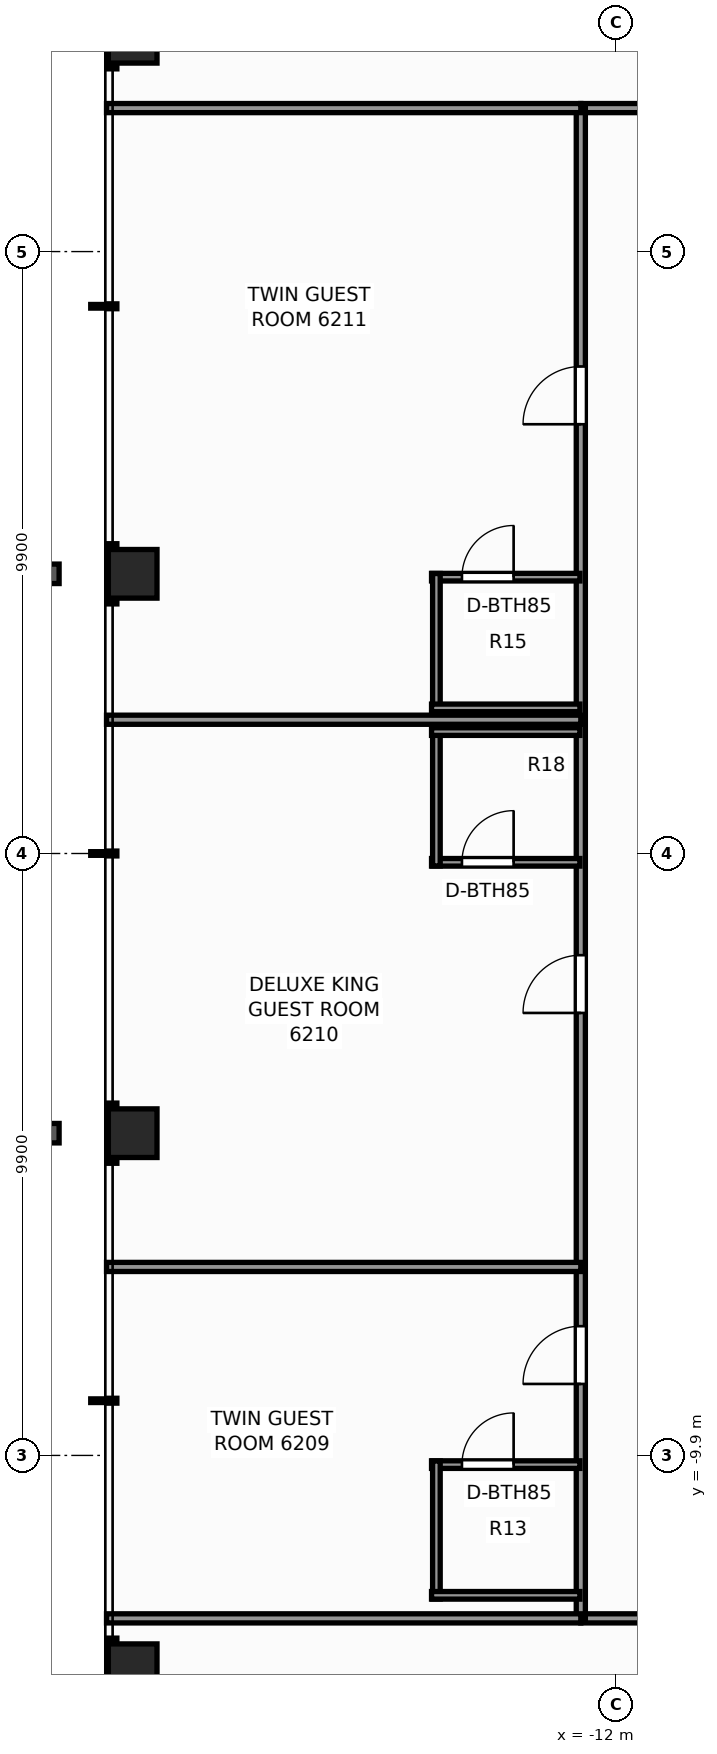
"""IFC4 building model, lengths in metres.
Left out: names, types, materials, properties, quantities, classifications, styles, units other than length and angle.
Written with IfcOpenShell. Run it as: python <this file> out.ifc"""

import sys

from ifc_helpers import new_model, si_unit, direction, frame, frame_2d, origin, origin_2d, place, context, subcontext, project, spatial, rectangle, extrude, element, fill, save


model = new_model("IFC4")
c1 = context("Model", 3, precision=1e-05, world=origin(), true_north=direction((0.0, 1.0)))
c2 = subcontext(c1, "Body", "Model", "MODEL_VIEW")
j1 = project(units=[si_unit("LENGTHUNIT", "METRE"), si_unit("PLANEANGLEUNIT", "RADIAN")], contexts=[c1])
p1 = place(None, origin())
s1 = spatial("IfcSite", under=j1, at=p1, CompositionType="ELEMENT")
p2 = place(p1, origin())
s2 = spatial("IfcBuilding", under=s1, at=p2, CompositionType="ELEMENT")
p3 = place(p2, frame((0.0, 0.0, 213.0)))
s3 = spatial("IfcBuildingStorey", under=s2, at=p3, CompositionType="ELEMENT", Elevation=213.0)
for number, where, z_axis, x_axis in (
    (1, (-19.95, -13.4, 0.0), (0.0, 0.0, 1.0), (1.0, 0.0, 0.0)),
    (2, (-19.95, -4.6, 0.0), (0.0, 0.0, 1.0), (1.0, 0.0, 0.0)),
    (3, (-19.95, 4.6, 0.0), (0.0, 0.0, 1.0), (1.0, 0.0, 0.0)),
    (4, (-19.95, 13.4, 0.0), (0.0, 0.0, 1.0), (1.0, 0.0, 0.0)),
):
    element("IfcColumn", number, at=place(p3, frame(where, z_axis=z_axis, x_axis=x_axis)), inside=s3, PredefinedType="COLUMN", context=c2, shape_type="SweptSolid", body=[
        extrude(rectangle(XDim=0.8, YDim=0.8, at=origin_2d()), origin(), (0.0, 0.0, 1.0), 3.3),
    ])
p4 = place(p3, frame((-12.58, -12.58, 0.0), z_axis=(0.0, 0.0, 1.0), x_axis=(1.0, 0.0, 0.0)))
e5 = element("IfcWall", 5, at=p4, inside=s3, PredefinedType="PARTITIONING", context=c2, shape_type="SweptSolid", body=[
    extrude(rectangle(XDim=25.16, YDim=0.15, at=frame_2d((12.58, 0.0))), origin(), (0.0, 0.0, 1.0), 2.369),
])
p5 = place(p4, frame((3.919, 0.0, 0.0)))
e6 = element("IfcOpeningElement", 6, at=p5, cuts=e5, PredefinedType="OPENING", context=c2, shape_type="SweptSolid", body=[
    extrude(rectangle(XDim=0.9, YDim=2.06, at=frame_2d((0.45, 1.03))), frame((0.0, 0.085, 0.0), z_axis=(0.0, -1.0, 0.0), x_axis=(1.0, 0.0, 0.0)), (0.0, 0.0, 1.0), 0.17),
])
p6 = place(p4, frame((8.951, 0.0, 0.0)))
e7 = element("IfcOpeningElement", 7, at=p6, cuts=e5, PredefinedType="OPENING", context=c2, shape_type="SweptSolid", body=[
    extrude(rectangle(XDim=0.9, YDim=2.06, at=frame_2d((0.45, 1.03))), frame((0.0, 0.085, 0.0), z_axis=(0.0, -1.0, 0.0), x_axis=(1.0, 0.0, 0.0)), (0.0, 0.0, 1.0), 0.17),
])
p7 = place(p4, frame((10.78, 0.0, 0.0)))
e8 = element("IfcOpeningElement", 8, at=p7, cuts=e5, PredefinedType="OPENING", context=c2, shape_type="SweptSolid", body=[
    extrude(rectangle(XDim=0.9, YDim=2.06, at=frame_2d((0.45, 1.03))), frame((0.0, 0.085, 0.0), z_axis=(0.0, -1.0, 0.0), x_axis=(1.0, 0.0, 0.0)), (0.0, 0.0, 1.0), 0.17),
])
p8 = place(p4, frame((13.749, 0.0, 0.0)))
e9 = element("IfcOpeningElement", 9, at=p8, cuts=e5, PredefinedType="OPENING", context=c2, shape_type="SweptSolid", body=[
    extrude(rectangle(XDim=0.95, YDim=2.06, at=frame_2d((0.475, 1.03))), frame((0.0, 0.085, 0.0), z_axis=(0.0, -1.0, 0.0), x_axis=(1.0, 0.0, 0.0)), (0.0, 0.0, 1.0), 0.17),
])
p9 = place(p4, frame((18.268, 0.0, 0.0)))
e10 = element("IfcOpeningElement", 10, at=p9, cuts=e5, PredefinedType="OPENING", context=c2, shape_type="SweptSolid", body=[
    extrude(rectangle(XDim=0.9, YDim=2.06, at=frame_2d((0.45, 1.03))), frame((0.0, 0.085, 0.0), z_axis=(0.0, -1.0, 0.0), x_axis=(1.0, 0.0, 0.0)), (0.0, 0.0, 1.0), 0.17),
])
p10 = place(p4, frame((20.283, 0.0, 0.0)))
e11 = element("IfcOpeningElement", 11, at=p10, cuts=e5, PredefinedType="OPENING", context=c2, shape_type="SweptSolid", body=[
    extrude(rectangle(XDim=0.95, YDim=2.06, at=frame_2d((0.475, 1.03))), frame((0.0, 0.085, 0.0), z_axis=(0.0, -1.0, 0.0), x_axis=(1.0, 0.0, 0.0)), (0.0, 0.0, 1.0), 0.17),
])
p11 = place(p3, frame((-12.58, 12.26, 0.0), z_axis=(0.0, 0.0, 1.0), x_axis=(1.0, 0.0, 0.0)))
e12 = element("IfcWall", 12, at=p11, inside=s3, PredefinedType="PARTITIONING", context=c2, shape_type="SweptSolid", body=[
    extrude(rectangle(XDim=25.16, YDim=0.15, at=frame_2d((12.58, 0.0))), origin(), (0.0, 0.0, 1.0), 2.369),
])
p12 = place(p11, frame((3.133, 0.0, 0.0)))
e13 = element("IfcOpeningElement", 13, at=p12, cuts=e12, PredefinedType="OPENING", context=c2, shape_type="SweptSolid", body=[
    extrude(rectangle(XDim=0.9, YDim=2.06, at=frame_2d((0.45, 1.03))), frame((0.0, 0.085, 0.0), z_axis=(0.0, -1.0, 0.0), x_axis=(1.0, 0.0, 0.0)), (0.0, 0.0, 1.0), 0.17),
])
p13 = place(p11, frame((9.188, 0.0, 0.0)))
e14 = element("IfcOpeningElement", 14, at=p13, cuts=e12, PredefinedType="OPENING", context=c2, shape_type="SweptSolid", body=[
    extrude(rectangle(XDim=0.95, YDim=2.06, at=frame_2d((0.475, 1.03))), frame((0.0, 0.085, 0.0), z_axis=(0.0, -1.0, 0.0), x_axis=(1.0, 0.0, 0.0)), (0.0, 0.0, 1.0), 0.17),
])
p14 = place(p11, frame((13.087, 0.0, 0.0)))
e15 = element("IfcOpeningElement", 15, at=p14, cuts=e12, PredefinedType="OPENING", context=c2, shape_type="SweptSolid", body=[
    extrude(rectangle(XDim=0.95, YDim=2.06, at=frame_2d((0.475, 1.03))), frame((0.0, 0.085, 0.0), z_axis=(0.0, -1.0, 0.0), x_axis=(1.0, 0.0, 0.0)), (0.0, 0.0, 1.0), 0.17),
])
p15 = place(p11, frame((19.665, 0.0, 0.0)))
e16 = element("IfcOpeningElement", 16, at=p15, cuts=e12, PredefinedType="OPENING", context=c2, shape_type="SweptSolid", body=[
    extrude(rectangle(XDim=0.9, YDim=2.06, at=frame_2d((0.45, 1.03))), frame((0.0, 0.085, 0.0), z_axis=(0.0, -1.0, 0.0), x_axis=(1.0, 0.0, 0.0)), (0.0, 0.0, 1.0), 0.17),
])
p16 = place(p3, frame((-12.58, -12.58, 0.0), z_axis=(0.0, 0.0, 1.0), x_axis=(0.0, 1.0, 0.0)))
e17 = element("IfcWall", 17, at=p16, inside=s3, PredefinedType="PARTITIONING", context=c2, shape_type="SweptSolid", body=[
    extrude(rectangle(XDim=24.84, YDim=0.15, at=frame_2d((12.42, 0.0))), origin(), (0.0, 0.0, 1.0), 2.369),
])
p17 = place(p16, frame((3.856, 0.0, 0.0)))
e18 = element("IfcOpeningElement", 18, at=p17, cuts=e17, PredefinedType="OPENING", context=c2, shape_type="SweptSolid", body=[
    extrude(rectangle(XDim=0.95, YDim=2.06, at=frame_2d((0.475, 1.03))), frame((0.0, 0.085, 0.0), z_axis=(0.0, -1.0, 0.0), x_axis=(1.0, 0.0, 0.0)), (0.0, 0.0, 1.0), 0.17),
])
p18 = place(p16, frame((9.958, 0.0, 0.0)))
e19 = element("IfcOpeningElement", 19, at=p18, cuts=e17, PredefinedType="OPENING", context=c2, shape_type="SweptSolid", body=[
    extrude(rectangle(XDim=0.95, YDim=2.06, at=frame_2d((0.475, 1.03))), frame((0.0, 0.085, 0.0), z_axis=(0.0, -1.0, 0.0), x_axis=(1.0, 0.0, 0.0)), (0.0, 0.0, 1.0), 0.17),
])
p19 = place(p16, frame((19.64, 0.0, 0.0)))
e20 = element("IfcOpeningElement", 20, at=p19, cuts=e17, PredefinedType="OPENING", context=c2, shape_type="SweptSolid", body=[
    extrude(rectangle(XDim=0.95, YDim=2.06, at=frame_2d((0.475, 1.03))), frame((0.0, 0.085, 0.0), z_axis=(0.0, -1.0, 0.0), x_axis=(1.0, 0.0, 0.0)), (0.0, 0.0, 1.0), 0.17),
])
for number, where, z_axis, x_axis in (
    (21, (-20.38, -12.58, 0.0), (0.0, 0.0, 1.0), (1.0, 0.0, 0.0)),
    (22, (-20.38, 12.26, 0.0), (0.0, 0.0, 1.0), (1.0, 0.0, 0.0)),
):
    element("IfcWall", number, at=place(p3, frame(where, z_axis=z_axis, x_axis=x_axis)), inside=s3, PredefinedType="PARTITIONING", context=c2, shape_type="SweptSolid", body=[
        extrude(rectangle(XDim=7.8, YDim=0.15, at=frame_2d((3.9, 0.0))), origin(), (0.0, 0.0, 1.0), 2.369),
    ])
p20 = place(p3, frame((-20.38, -6.8, 0.0), z_axis=(0.0, 0.0, 1.0), x_axis=(1.0, 0.0, 0.0)))
e23 = element("IfcWall", 23, at=p20, inside=s3, PredefinedType="PARTITIONING", context=c2, shape_type="SweptSolid", body=[
    extrude(rectangle(XDim=7.8, YDim=0.15, at=frame_2d((3.9, 0.0))), origin(), (0.0, 0.0, 1.0), 2.453),
])
p21 = place(p3, frame((-15.035, -10.051, 0.0), z_axis=(0.0, 0.0, 1.0), x_axis=(1.0, 0.0, 0.0)))
e24 = element("IfcWall", 24, at=p21, inside=s3, PredefinedType="PARTITIONING", context=c2, shape_type="SweptSolid", body=[
    extrude(rectangle(XDim=2.44, YDim=0.125, at=frame_2d((1.22, 0.0))), origin(), (0.0, 0.0, 1.0), 3.08),
])
p22 = place(p21, frame((0.5, 0.0, 0.0)))
e25 = element("IfcOpeningElement", 25, at=p22, cuts=e24, PredefinedType="OPENING", context=c2, shape_type="SweptSolid", body=[
    extrude(rectangle(XDim=0.85, YDim=2.03, at=frame_2d((0.425, 1.015))), frame((0.0, 0.073, 0.0), z_axis=(0.0, -1.0, 0.0), x_axis=(1.0, 0.0, 0.0)), (0.0, 0.0, 1.0), 0.145),
])
p23 = place(p3, frame((-14.955, -12.261, 0.0), z_axis=(0.0, 0.0, 1.0), x_axis=(0.0, 1.0, 0.0)))
e26 = element("IfcWall", 26, at=p23, inside=s3, PredefinedType="PARTITIONING", context=c2, shape_type="SweptSolid", body=[
    extrude(rectangle(XDim=2.27, YDim=0.125, at=frame_2d((1.135, 0.0))), origin(), (0.0, 0.0, 1.0), 2.369),
])
p24 = place(p3, frame((-15.035, -12.201, 0.0), z_axis=(0.0, 0.0, 1.0), x_axis=(1.0, 0.0, 0.0)))
e27 = element("IfcWall", 27, at=p24, inside=s3, PredefinedType="PARTITIONING", context=c2, shape_type="SweptSolid", body=[
    extrude(rectangle(XDim=2.44, YDim=0.125, at=frame_2d((1.22, 0.0))), origin(), (0.0, 0.0, 1.0), 3.08),
])
p25 = place(p3, frame((-20.38, 2.2, 0.0), z_axis=(0.0, 0.0, 1.0), x_axis=(1.0, 0.0, 0.0)))
e28 = element("IfcWall", 28, at=p25, inside=s3, PredefinedType="PARTITIONING", context=c2, shape_type="SweptSolid", body=[
    extrude(rectangle(XDim=7.8, YDim=0.15, at=frame_2d((3.9, 0.0))), origin(), (0.0, 0.0, 1.0), 2.453),
])
p26 = place(p3, frame((-15.035, -0.145, 0.0), z_axis=(0.0, 0.0, 1.0), x_axis=(1.0, 0.0, 0.0)))
e29 = element("IfcWall", 29, at=p26, inside=s3, PredefinedType="PARTITIONING", context=c2, shape_type="SweptSolid", body=[
    extrude(rectangle(XDim=2.44, YDim=0.125, at=frame_2d((1.22, 0.0))), origin(), (0.0, 0.0, 1.0), 2.605),
])
p27 = place(p26, frame((0.5, 0.0, 0.0)))
e30 = element("IfcOpeningElement", 30, at=p27, cuts=e29, PredefinedType="OPENING", context=c2, shape_type="SweptSolid", body=[
    extrude(rectangle(XDim=0.85, YDim=2.03, at=frame_2d((0.425, 1.015))), frame((0.0, 0.073, 0.0), z_axis=(0.0, -1.0, 0.0), x_axis=(1.0, 0.0, 0.0)), (0.0, 0.0, 1.0), 0.145),
])
p28 = place(p3, frame((-14.955, -0.205, 0.0), z_axis=(0.0, 0.0, 1.0), x_axis=(0.0, 1.0, 0.0)))
e31 = element("IfcWall", 31, at=p28, inside=s3, PredefinedType="PARTITIONING", context=c2, shape_type="SweptSolid", body=[
    extrude(rectangle(XDim=2.27, YDim=0.125, at=frame_2d((1.135, 0.0))), origin(), (0.0, 0.0, 1.0), 2.605),
])
p29 = place(p3, frame((-15.035, 2.005, 0.0), z_axis=(0.0, 0.0, 1.0), x_axis=(1.0, 0.0, 0.0)))
e32 = element("IfcWall", 32, at=p29, inside=s3, PredefinedType="PARTITIONING", context=c2, shape_type="SweptSolid", body=[
    extrude(rectangle(XDim=2.44, YDim=0.125, at=frame_2d((1.22, 0.0))), origin(), (0.0, 0.0, 1.0), 3.08),
])
p30 = place(p3, frame((-15.035, 4.545, 0.0), z_axis=(0.0, 0.0, 1.0), x_axis=(1.0, 0.0, 0.0)))
e33 = element("IfcWall", 33, at=p30, inside=s3, PredefinedType="PARTITIONING", context=c2, shape_type="SweptSolid", body=[
    extrude(rectangle(XDim=2.44, YDim=0.125, at=frame_2d((1.22, 0.0))), origin(), (0.0, 0.0, 1.0), 2.369),
])
p31 = place(p30, frame((0.5, 0.0, 0.0)))
e34 = element("IfcOpeningElement", 34, at=p31, cuts=e33, PredefinedType="OPENING", context=c2, shape_type="SweptSolid", body=[
    extrude(rectangle(XDim=0.85, YDim=2.03, at=frame_2d((0.425, 1.015))), frame((0.0, 0.073, 0.0), z_axis=(0.0, -1.0, 0.0), x_axis=(1.0, 0.0, 0.0)), (0.0, 0.0, 1.0), 0.145),
])
p32 = place(p3, frame((-14.955, 2.335, 0.0), z_axis=(0.0, 0.0, 1.0), x_axis=(0.0, 1.0, 0.0)))
e35 = element("IfcWall", 35, at=p32, inside=s3, PredefinedType="PARTITIONING", context=c2, shape_type="SweptSolid", body=[
    extrude(rectangle(XDim=2.27, YDim=0.125, at=frame_2d((1.135, 0.0))), origin(), (0.0, 0.0, 1.0), 2.369),
])
p33 = place(p3, frame((-15.035, 2.395, 0.0), z_axis=(0.0, 0.0, 1.0), x_axis=(1.0, 0.0, 0.0)))
e36 = element("IfcWall", 36, at=p33, inside=s3, PredefinedType="PARTITIONING", context=c2, shape_type="SweptSolid", body=[
    extrude(rectangle(XDim=2.44, YDim=0.125, at=frame_2d((1.22, 0.0))), origin(), (0.0, 0.0, 1.0), 3.08),
])
p34 = place(p22, origin())
e37 = element("IfcDoor", 37, at=p34, inside=s3, OperationType="SINGLE_SWING_RIGHT", PredefinedType="DOOR", context=c2, shape_type="SweptSolid", body=[
    extrude(rectangle(XDim=0.85, YDim=2.03, at=frame_2d((0.425, 1.015))), frame((0.0, 0.025, 0.0), z_axis=(0.0, -1.0, 0.0), x_axis=(1.0, 0.0, 0.0)), (0.0, 0.0, 1.0), 0.05),
])
fill(e25, e37)
p35 = place(p17, origin())
e38 = element("IfcDoor", 38, at=p35, inside=s3, OperationType="SINGLE_SWING_LEFT", PredefinedType="DOOR", context=c2, shape_type="SweptSolid", body=[
    extrude(rectangle(XDim=0.95, YDim=2.06, at=frame_2d((0.475, 1.03))), frame((0.0, 0.025, 0.0), z_axis=(0.0, -1.0, 0.0), x_axis=(1.0, 0.0, 0.0)), (0.0, 0.0, 1.0), 0.05),
])
fill(e18, e38)
p36 = place(p27, origin())
e39 = element("IfcDoor", 39, at=p36, inside=s3, OperationType="SINGLE_SWING_RIGHT", PredefinedType="DOOR", context=c2, shape_type="SweptSolid", body=[
    extrude(rectangle(XDim=0.85, YDim=2.03, at=frame_2d((0.425, 1.015))), frame((0.0, 0.025, 0.0), z_axis=(0.0, -1.0, 0.0), x_axis=(1.0, 0.0, 0.0)), (0.0, 0.0, 1.0), 0.05),
])
fill(e30, e39)
p37 = place(p18, origin())
e40 = element("IfcDoor", 40, at=p37, inside=s3, OperationType="SINGLE_SWING_LEFT", PredefinedType="DOOR", context=c2, shape_type="SweptSolid", body=[
    extrude(rectangle(XDim=0.95, YDim=2.06, at=frame_2d((0.475, 1.03))), frame((0.0, 0.025, 0.0), z_axis=(0.0, -1.0, 0.0), x_axis=(1.0, 0.0, 0.0)), (0.0, 0.0, 1.0), 0.05),
])
fill(e19, e40)
p38 = place(p31, origin())
e41 = element("IfcDoor", 41, at=p38, inside=s3, OperationType="SINGLE_SWING_RIGHT", PredefinedType="DOOR", context=c2, shape_type="SweptSolid", body=[
    extrude(rectangle(XDim=0.85, YDim=2.03, at=frame_2d((0.425, 1.015))), frame((0.0, 0.025, 0.0), z_axis=(0.0, -1.0, 0.0), x_axis=(1.0, 0.0, 0.0)), (0.0, 0.0, 1.0), 0.05),
])
fill(e34, e41)
p39 = place(p19, origin())
e42 = element("IfcDoor", 42, at=p39, inside=s3, OperationType="SINGLE_SWING_LEFT", PredefinedType="DOOR", context=c2, shape_type="SweptSolid", body=[
    extrude(rectangle(XDim=0.95, YDim=2.06, at=frame_2d((0.475, 1.03))), frame((0.0, 0.025, 0.0), z_axis=(0.0, -1.0, 0.0), x_axis=(1.0, 0.0, 0.0)), (0.0, 0.0, 1.0), 0.05),
])
fill(e20, e42)
save(model, sys.argv[1])
